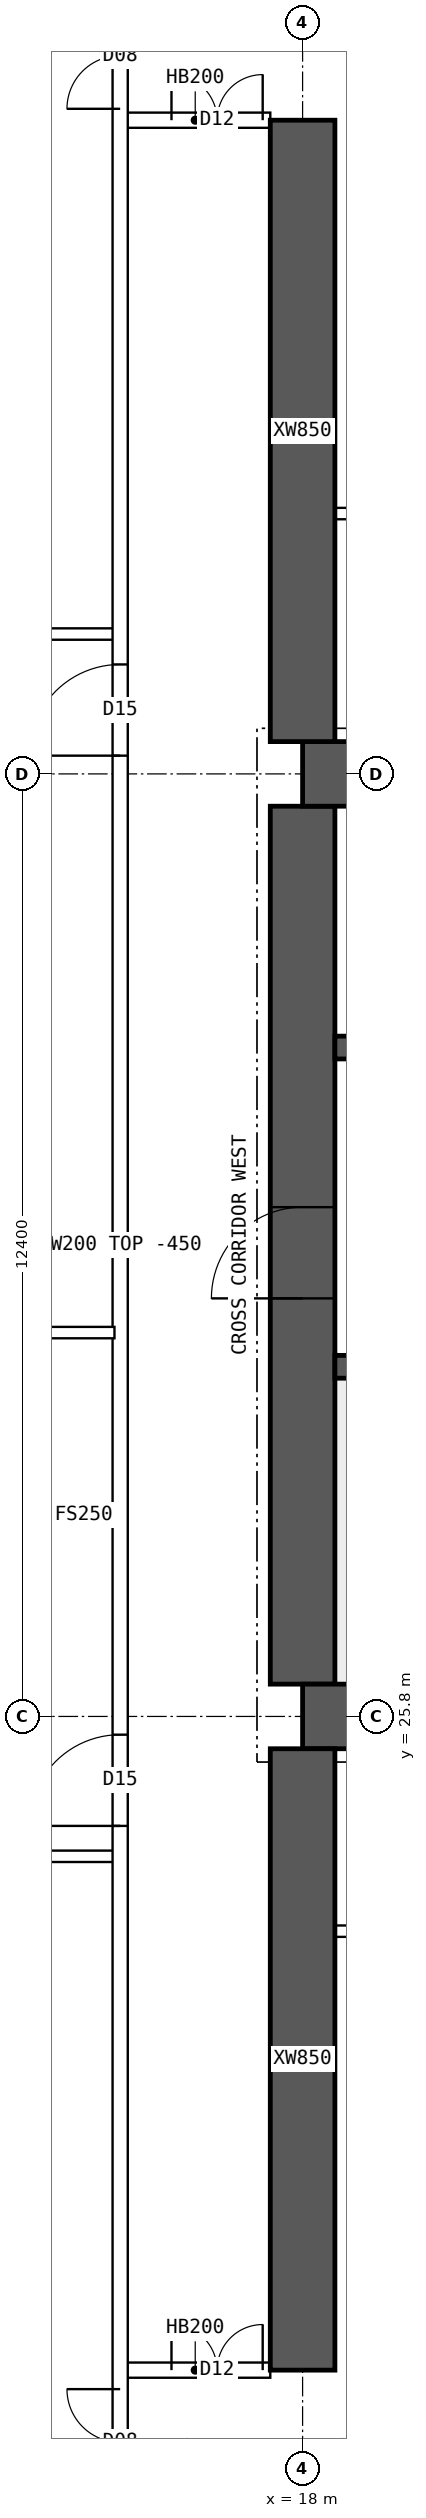
"""IFC4 building model, lengths in metres.
Left out: names, types, materials, properties, quantities, classifications, styles, units other than length and angle.
Written with IfcOpenShell. Run it as: python <this file> out.ifc"""

import sys

from ifc_helpers import new_model, si_unit, direction, frame, frame_2d, origin, place, context, subcontext, project, spatial, polyline, rectangle, outline, extrude, element, fill, save


model = new_model("IFC4")
c1 = context("Model", 3, precision=1e-05, world=origin(), true_north=direction((0.0, 1.0)))
c2 = subcontext(c1, "Body", "Model", "MODEL_VIEW")
j1 = project(units=[si_unit("LENGTHUNIT", "METRE"), si_unit("PLANEANGLEUNIT", "RADIAN")], contexts=[c1])
p1 = place(None, origin())
s1 = spatial("IfcSite", under=j1, at=p1, CompositionType="ELEMENT")
p2 = place(p1, origin())
s2 = spatial("IfcBuilding", under=s1, at=p2, CompositionType="ELEMENT")
p3 = place(p2, frame((0.0, 0.0, 174.85)))
s3 = spatial("IfcBuildingStorey", under=s2, at=p3, CompositionType="ELEMENT", Elevation=174.85)
for number, where, z_axis, x_axis in (
    (1, (18.0, 25.8, 0.0), (0.0, 0.0, 1.0), (1.0, 0.0, 0.0)),
    (2, (18.0, 38.2, 0.0), (0.0, 0.0, 1.0), (1.0, 0.0, 0.0)),
):
    element("IfcWall", number, at=place(p3, frame(where, z_axis=z_axis, x_axis=x_axis)), inside=s3, PredefinedType="SHEAR", context=c2, shape_type="SweptSolid", body=[
        extrude(rectangle(XDim=48.0, YDim=0.85, at=frame_2d((24.0, 0.0))), origin(), (0.0, 0.0, 1.0), 3.75),
    ])
p4 = place(p3, frame((18.0, 26.225, 0.0), z_axis=(0.0, 0.0, 1.0), x_axis=(0.0, 1.0, 0.0)))
e3 = element("IfcWall", 3, at=p4, inside=s3, PredefinedType="SHEAR", context=c2, shape_type="SweptSolid", body=[
    extrude(rectangle(XDim=11.55, YDim=0.85, at=frame_2d((5.775, 0.0))), origin(), (0.0, 0.0, 1.0), 3.75),
])
p5 = place(p4, frame((5.075, 0.0, 0.0)))
e4 = element("IfcOpeningElement", 4, at=p5, cuts=e3, PredefinedType="OPENING", context=c2, shape_type="SweptSolid", body=[
    extrude(rectangle(XDim=1.2, YDim=2.1, at=frame_2d((0.6, 1.05))), frame((0.0, 0.435, 0.0), z_axis=(0.0, -1.0, 0.0), x_axis=(1.0, 0.0, 0.0)), (0.0, 0.0, 1.0), 0.87),
])
p6 = place(p3, frame((18.425, 30.4, 0.0), z_axis=(0.0, 0.0, 1.0), x_axis=(1.0, 0.0, 0.0)))
e5 = element("IfcWall", 5, at=p6, inside=s3, PredefinedType="SHEAR", context=c2, shape_type="SweptSolid", body=[
    extrude(rectangle(XDim=47.15, YDim=0.3, at=frame_2d((23.575, 0.0))), origin(), (0.0, 0.0, 1.0), 3.75),
])
p7 = place(p6, frame((0.4, 0.0, 0.0)))
e6 = element("IfcOpeningElement", 6, at=p7, cuts=e5, PredefinedType="OPENING", context=c2, shape_type="SweptSolid", body=[
    extrude(rectangle(XDim=1.0, YDim=2.1, at=frame_2d((0.5, 1.05))), frame((0.0, 0.16, 0.0), z_axis=(0.0, -1.0, 0.0), x_axis=(1.0, 0.0, 0.0)), (0.0, 0.0, 1.0), 0.32),
])
p8 = place(p6, frame((45.75, 0.0, 0.0)))
e7 = element("IfcOpeningElement", 7, at=p8, cuts=e5, PredefinedType="OPENING", context=c2, shape_type="SweptSolid", body=[
    extrude(rectangle(XDim=1.0, YDim=2.1, at=frame_2d((0.5, 1.05))), frame((0.0, 0.16, 0.0), z_axis=(0.0, -1.0, 0.0), x_axis=(1.0, 0.0, 0.0)), (0.0, 0.0, 1.0), 0.32),
])
p9 = place(p6, frame((8.325, 0.0, 0.0)))
e8 = element("IfcOpeningElement", 8, at=p9, cuts=e5, PredefinedType="OPENING", context=c2, shape_type="SweptSolid", body=[
    extrude(rectangle(XDim=1.1, YDim=2.1, at=frame_2d((0.55, 1.05))), frame((0.0, 0.16, 0.0), z_axis=(0.0, -1.0, 0.0), x_axis=(1.0, 0.0, 0.0)), (0.0, 0.0, 1.0), 0.32),
])
p10 = place(p6, frame((10.925, 0.0, 0.0)))
e9 = element("IfcOpeningElement", 9, at=p10, cuts=e5, PredefinedType="OPENING", context=c2, shape_type="SweptSolid", body=[
    extrude(rectangle(XDim=1.1, YDim=2.1, at=frame_2d((0.55, 1.05))), frame((0.0, 0.16, 0.0), z_axis=(0.0, -1.0, 0.0), x_axis=(1.0, 0.0, 0.0)), (0.0, 0.0, 1.0), 0.32),
])
p11 = place(p6, frame((13.525, 0.0, 0.0)))
e10 = element("IfcOpeningElement", 10, at=p11, cuts=e5, PredefinedType="OPENING", context=c2, shape_type="SweptSolid", body=[
    extrude(rectangle(XDim=1.1, YDim=2.1, at=frame_2d((0.55, 1.05))), frame((0.0, 0.16, 0.0), z_axis=(0.0, -1.0, 0.0), x_axis=(1.0, 0.0, 0.0)), (0.0, 0.0, 1.0), 0.32),
])
p12 = place(p6, frame((16.125, 0.0, 0.0)))
e11 = element("IfcOpeningElement", 11, at=p12, cuts=e5, PredefinedType="OPENING", context=c2, shape_type="SweptSolid", body=[
    extrude(rectangle(XDim=1.1, YDim=2.1, at=frame_2d((0.55, 1.05))), frame((0.0, 0.16, 0.0), z_axis=(0.0, -1.0, 0.0), x_axis=(1.0, 0.0, 0.0)), (0.0, 0.0, 1.0), 0.32),
])
p13 = place(p6, frame((18.9, 0.0, 0.0)))
e12 = element("IfcOpeningElement", 12, at=p13, cuts=e5, PredefinedType="OPENING", context=c2, shape_type="SweptSolid", body=[
    extrude(rectangle(XDim=0.9, YDim=2.1, at=frame_2d((0.45, 1.05))), frame((0.0, 0.16, 0.0), z_axis=(0.0, -1.0, 0.0), x_axis=(1.0, 0.0, 0.0)), (0.0, 0.0, 1.0), 0.32),
])
p14 = place(p6, frame((30.192, 0.0, 0.0)))
e13 = element("IfcOpeningElement", 13, at=p14, cuts=e5, PredefinedType="OPENING", context=c2, shape_type="SweptSolid", body=[
    extrude(rectangle(XDim=1.1, YDim=2.1, at=frame_2d((0.55, 1.05))), frame((0.0, 0.16, 0.0), z_axis=(0.0, -1.0, 0.0), x_axis=(1.0, 0.0, 0.0)), (0.0, 0.0, 1.0), 0.32),
])
p15 = place(p6, frame((33.725, 0.0, 0.0)))
e14 = element("IfcOpeningElement", 14, at=p15, cuts=e5, PredefinedType="OPENING", context=c2, shape_type="SweptSolid", body=[
    extrude(rectangle(XDim=1.1, YDim=2.1, at=frame_2d((0.55, 1.05))), frame((0.0, 0.16, 0.0), z_axis=(0.0, -1.0, 0.0), x_axis=(1.0, 0.0, 0.0)), (0.0, 0.0, 1.0), 0.32),
])
p16 = place(p6, frame((37.258, 0.0, 0.0)))
e15 = element("IfcOpeningElement", 15, at=p16, cuts=e5, PredefinedType="OPENING", context=c2, shape_type="SweptSolid", body=[
    extrude(rectangle(XDim=1.1, YDim=2.1, at=frame_2d((0.55, 1.05))), frame((0.0, 0.16, 0.0), z_axis=(0.0, -1.0, 0.0), x_axis=(1.0, 0.0, 0.0)), (0.0, 0.0, 1.0), 0.32),
])
p17 = place(p3, frame((18.425, 34.6, 0.0), z_axis=(0.0, 0.0, 1.0), x_axis=(1.0, 0.0, 0.0)))
e16 = element("IfcWall", 16, at=p17, inside=s3, PredefinedType="SHEAR", context=c2, shape_type="SweptSolid", body=[
    extrude(rectangle(XDim=47.15, YDim=0.3, at=frame_2d((23.575, 0.0))), origin(), (0.0, 0.0, 1.0), 3.75),
])
p18 = place(p17, frame((0.9, 0.0, 0.0)))
e17 = element("IfcOpeningElement", 17, at=p18, cuts=e16, PredefinedType="OPENING", context=c2, shape_type="SweptSolid", body=[
    extrude(rectangle(XDim=1.1, YDim=2.1, at=frame_2d((0.55, 1.05))), frame((0.0, 0.16, 0.0), z_axis=(0.0, -1.0, 0.0), x_axis=(1.0, 0.0, 0.0)), (0.0, 0.0, 1.0), 0.32),
])
p19 = place(p17, frame((45.15, 0.0, 0.0)))
e18 = element("IfcOpeningElement", 18, at=p19, cuts=e16, PredefinedType="OPENING", context=c2, shape_type="SweptSolid", body=[
    extrude(rectangle(XDim=1.1, YDim=2.1, at=frame_2d((0.55, 1.05))), frame((0.0, 0.16, 0.0), z_axis=(0.0, -1.0, 0.0), x_axis=(1.0, 0.0, 0.0)), (0.0, 0.0, 1.0), 0.32),
])
p20 = place(p17, frame((4.175, 0.0, 0.0)))
e19 = element("IfcOpeningElement", 19, at=p20, cuts=e16, PredefinedType="OPENING", context=c2, shape_type="SweptSolid", body=[
    extrude(rectangle(XDim=0.9, YDim=2.1, at=frame_2d((0.45, 1.05))), frame((0.0, 0.16, 0.0), z_axis=(0.0, -1.0, 0.0), x_axis=(1.0, 0.0, 0.0)), (0.0, 0.0, 1.0), 0.32),
])
p21 = place(p17, frame((42.075, 0.0, 0.0)))
e20 = element("IfcOpeningElement", 20, at=p21, cuts=e16, PredefinedType="OPENING", context=c2, shape_type="SweptSolid", body=[
    extrude(rectangle(XDim=0.9, YDim=2.1, at=frame_2d((0.45, 1.05))), frame((0.0, 0.16, 0.0), z_axis=(0.0, -1.0, 0.0), x_axis=(1.0, 0.0, 0.0)), (0.0, 0.0, 1.0), 0.32),
])
p22 = place(p17, frame((8.95, 0.0, 0.0)))
e21 = element("IfcOpeningElement", 21, at=p22, cuts=e16, PredefinedType="OPENING", context=c2, shape_type="SweptSolid", body=[
    extrude(rectangle(XDim=0.9, YDim=2.1, at=frame_2d((0.45, 1.05))), frame((0.0, 0.16, 0.0), z_axis=(0.0, -1.0, 0.0), x_axis=(1.0, 0.0, 0.0)), (0.0, 0.0, 1.0), 0.32),
])
p23 = place(p17, frame((12.924, 0.0, 0.0)))
e22 = element("IfcOpeningElement", 22, at=p23, cuts=e16, PredefinedType="OPENING", context=c2, shape_type="SweptSolid", body=[
    extrude(rectangle(XDim=0.9, YDim=2.1, at=frame_2d((0.45, 1.05))), frame((0.0, 0.16, 0.0), z_axis=(0.0, -1.0, 0.0), x_axis=(1.0, 0.0, 0.0)), (0.0, 0.0, 1.0), 0.32),
])
p24 = place(p17, frame((16.571, 0.0, 0.0)))
e23 = element("IfcOpeningElement", 23, at=p24, cuts=e16, PredefinedType="OPENING", context=c2, shape_type="SweptSolid", body=[
    extrude(rectangle(XDim=0.9, YDim=2.1, at=frame_2d((0.45, 1.05))), frame((0.0, 0.16, 0.0), z_axis=(0.0, -1.0, 0.0), x_axis=(1.0, 0.0, 0.0)), (0.0, 0.0, 1.0), 0.32),
])
p25 = place(p17, frame((20.33, 0.0, 0.0)))
e24 = element("IfcOpeningElement", 24, at=p25, cuts=e16, PredefinedType="OPENING", context=c2, shape_type="SweptSolid", body=[
    extrude(rectangle(XDim=0.9, YDim=2.1, at=frame_2d((0.45, 1.05))), frame((0.0, 0.16, 0.0), z_axis=(0.0, -1.0, 0.0), x_axis=(1.0, 0.0, 0.0)), (0.0, 0.0, 1.0), 0.32),
])
p26 = place(p17, frame((24.736, 0.0, 0.0)))
e25 = element("IfcOpeningElement", 25, at=p26, cuts=e16, PredefinedType="OPENING", context=c2, shape_type="SweptSolid", body=[
    extrude(rectangle(XDim=0.9, YDim=2.1, at=frame_2d((0.45, 1.05))), frame((0.0, 0.16, 0.0), z_axis=(0.0, -1.0, 0.0), x_axis=(1.0, 0.0, 0.0)), (0.0, 0.0, 1.0), 0.32),
])
p27 = place(p17, frame((27.533, 0.0, 0.0)))
e26 = element("IfcOpeningElement", 26, at=p27, cuts=e16, PredefinedType="OPENING", context=c2, shape_type="SweptSolid", body=[
    extrude(rectangle(XDim=0.9, YDim=2.1, at=frame_2d((0.45, 1.05))), frame((0.0, 0.16, 0.0), z_axis=(0.0, -1.0, 0.0), x_axis=(1.0, 0.0, 0.0)), (0.0, 0.0, 1.0), 0.32),
])
p28 = place(p17, frame((29.5, 0.0, 0.0)))
e27 = element("IfcOpeningElement", 27, at=p28, cuts=e16, PredefinedType="OPENING", context=c2, shape_type="SweptSolid", body=[
    extrude(rectangle(XDim=0.9, YDim=2.1, at=frame_2d((0.45, 1.05))), frame((0.0, 0.16, 0.0), z_axis=(0.0, -1.0, 0.0), x_axis=(1.0, 0.0, 0.0)), (0.0, 0.0, 1.0), 0.32),
])
p29 = place(p17, frame((31.932, 0.0, 0.0)))
e28 = element("IfcOpeningElement", 28, at=p29, cuts=e16, PredefinedType="OPENING", context=c2, shape_type="SweptSolid", body=[
    extrude(rectangle(XDim=0.9, YDim=2.1, at=frame_2d((0.45, 1.05))), frame((0.0, 0.16, 0.0), z_axis=(0.0, -1.0, 0.0), x_axis=(1.0, 0.0, 0.0)), (0.0, 0.0, 1.0), 0.32),
])
p30 = place(p17, frame((34.667, 0.0, 0.0)))
e29 = element("IfcOpeningElement", 29, at=p30, cuts=e16, PredefinedType="OPENING", context=c2, shape_type="SweptSolid", body=[
    extrude(rectangle(XDim=0.9, YDim=2.1, at=frame_2d((0.45, 1.05))), frame((0.0, 0.16, 0.0), z_axis=(0.0, -1.0, 0.0), x_axis=(1.0, 0.0, 0.0)), (0.0, 0.0, 1.0), 0.32),
])
p31 = place(p17, frame((37.707, 0.0, 0.0)))
e30 = element("IfcOpeningElement", 30, at=p31, cuts=e16, PredefinedType="OPENING", context=c2, shape_type="SweptSolid", body=[
    extrude(rectangle(XDim=0.9, YDim=2.1, at=frame_2d((0.45, 1.05))), frame((0.0, 0.16, 0.0), z_axis=(0.0, -1.0, 0.0), x_axis=(1.0, 0.0, 0.0)), (0.0, 0.0, 1.0), 0.32),
])
for number, where, z_axis, x_axis in (
    (31, (18.0, 17.2, 0.0), (0.0, 0.0, 1.0), (0.0, 1.0, 0.0)),
    (32, (18.0, 38.625, 0.0), (0.0, 0.0, 1.0), (0.0, 1.0, 0.0)),
):
    element("IfcWall", number, at=place(p3, frame(where, z_axis=z_axis, x_axis=x_axis)), inside=s3, PredefinedType="SHEAR", context=c2, shape_type="SweptSolid", body=[
        extrude(rectangle(XDim=8.175, YDim=0.85, at=frame_2d((4.087, 0.0))), origin(), (0.0, 0.0, 1.0), 3.75),
    ])
p32 = place(p3, frame((15.6, 17.2, 0.0), z_axis=(0.0, 0.0, 1.0), x_axis=(1.0, 0.0, 0.0)))
e33 = element("IfcWall", 33, at=p32, inside=s3, PredefinedType="SOLIDWALL", context=c2, shape_type="SweptSolid", body=[
    extrude(rectangle(XDim=1.975, YDim=0.2, at=frame_2d((0.987, 0.0))), origin(), (0.0, 0.0, 1.0), 3.3),
])
p33 = place(p32, frame((0.675, 0.0, 0.0)))
e34 = element("IfcOpeningElement", 34, at=p33, cuts=e33, PredefinedType="OPENING", context=c2, shape_type="SweptSolid", body=[
    extrude(rectangle(XDim=1.2, YDim=2.1, at=frame_2d((0.6, 1.05))), frame((0.0, 0.11, 0.0), z_axis=(0.0, -1.0, 0.0), x_axis=(1.0, 0.0, 0.0)), (0.0, 0.0, 1.0), 0.22),
])
p34 = place(p3, frame((15.6, 46.8, 0.0), z_axis=(0.0, 0.0, 1.0), x_axis=(1.0, 0.0, 0.0)))
e35 = element("IfcWall", 35, at=p34, inside=s3, PredefinedType="SOLIDWALL", context=c2, shape_type="SweptSolid", body=[
    extrude(rectangle(XDim=1.975, YDim=0.2, at=frame_2d((0.987, 0.0))), origin(), (0.0, 0.0, 1.0), 3.3),
])
p35 = place(p34, frame((0.675, 0.0, 0.0)))
e36 = element("IfcOpeningElement", 36, at=p35, cuts=e35, PredefinedType="OPENING", context=c2, shape_type="SweptSolid", body=[
    extrude(rectangle(XDim=1.2, YDim=2.1, at=frame_2d((0.6, 1.05))), frame((0.0, 0.11, 0.0), z_axis=(0.0, -1.0, 0.0), x_axis=(1.0, 0.0, 0.0)), (0.0, 0.0, 1.0), 0.22),
])
p36 = place(p3, frame((18.425, 22.975, 0.0), z_axis=(0.0, 0.0, 1.0), x_axis=(1.0, 0.0, 0.0)))
e37 = element("IfcWall", 37, at=p36, inside=s3, PredefinedType="PARTITIONING", context=c2, shape_type="SweptSolid", body=[
    extrude(rectangle(XDim=5.5, YDim=0.15, at=frame_2d((2.75, 0.0))), origin(), (0.0, 0.0, 1.0), 3.3),
])
p37 = place(p36, frame((0.4, 0.0, 0.0)))
e38 = element("IfcOpeningElement", 38, at=p37, cuts=e37, PredefinedType="OPENING", context=c2, shape_type="SweptSolid", body=[
    extrude(rectangle(XDim=1.0, YDim=2.1, at=frame_2d((0.5, 1.05))), frame((0.0, 0.085, 0.0), z_axis=(0.0, -1.0, 0.0), x_axis=(1.0, 0.0, 0.0)), (0.0, 0.0, 1.0), 0.17),
])
p38 = place(p3, frame((23.925, 41.625, 0.0), z_axis=(0.0, 0.0, 1.0), x_axis=(-1.0, 0.0, 0.0)))
e39 = element("IfcWall", 39, at=p38, inside=s3, PredefinedType="PARTITIONING", context=c2, shape_type="SweptSolid", body=[
    extrude(rectangle(XDim=5.5, YDim=0.15, at=frame_2d((2.75, 0.0))), origin(), (0.0, 0.0, 1.0), 3.3),
])
p39 = place(p38, frame((0.4, 0.0, 0.0)))
e40 = element("IfcOpeningElement", 40, at=p39, cuts=e39, PredefinedType="OPENING", context=c2, shape_type="SweptSolid", body=[
    extrude(rectangle(XDim=1.0, YDim=2.1, at=frame_2d((0.5, 1.05))), frame((0.0, 0.085, 0.0), z_axis=(0.0, -1.0, 0.0), x_axis=(1.0, 0.0, 0.0)), (0.0, 0.0, 1.0), 0.17),
])
p40 = place(p3, frame((8.705, 30.85, 0.0), z_axis=(0.0, 0.0, 1.0), x_axis=(1.0, 0.0, 0.0)))
e41 = element("IfcWall", 41, at=p40, inside=s3, PredefinedType="PARTITIONING", context=c2, shape_type="SweptSolid", body=[
    extrude(outline(polyline([(0.0, 0.0), (6.82, 0.0), (6.82, 3.3), (3.597, 3.3), (3.595, 2.85), (2.997, 2.85), (2.995, 3.3), (0.0, 3.3), (0.0, 0.0)])), frame((0.0, 0.075, 0.0), z_axis=(0.0, -1.0, 0.0), x_axis=(1.0, 0.0, 0.0)), (0.0, 0.0, 1.0), 0.15),
])
p41 = place(p3, frame((15.6, 10.446, 0.0), z_axis=(0.0, 0.0, 1.0), x_axis=(0.0, 1.0, 0.0)))
e42 = element("IfcWall", 42, at=p41, inside=s3, PredefinedType="SOLIDWALL", context=c2, shape_type="SweptSolid", body=[
    extrude(rectangle(XDim=43.107, YDim=0.2, at=frame_2d((21.554, 0.0))), origin(), (0.0, 0.0, 1.0), 3.3),
])
p42 = place(p41, frame((13.914, 0.0, 0.0)))
e43 = element("IfcOpeningElement", 43, at=p42, cuts=e42, PredefinedType="OPENING", context=c2, shape_type="SweptSolid", body=[
    extrude(rectangle(XDim=1.2, YDim=2.1, at=frame_2d((0.6, 1.05))), frame((0.0, 0.11, 0.0), z_axis=(0.0, -1.0, 0.0), x_axis=(1.0, 0.0, 0.0)), (0.0, 0.0, 1.0), 0.22),
])
p43 = place(p41, frame((27.994, 0.0, 0.0)))
e44 = element("IfcOpeningElement", 44, at=p43, cuts=e42, PredefinedType="OPENING", context=c2, shape_type="SweptSolid", body=[
    extrude(rectangle(XDim=1.2, YDim=2.1, at=frame_2d((0.6, 1.05))), frame((0.0, 0.11, 0.0), z_axis=(0.0, -1.0, 0.0), x_axis=(1.0, 0.0, 0.0)), (0.0, 0.0, 1.0), 0.22),
])
p44 = place(p41, frame((5.104, 0.0, 0.0)))
e45 = element("IfcOpeningElement", 45, at=p44, cuts=e42, PredefinedType="OPENING", context=c2, shape_type="SweptSolid", body=[
    extrude(rectangle(XDim=1.4, YDim=2.1, at=frame_2d((0.7, 1.05))), frame((0.0, 0.11, 0.0), z_axis=(0.0, -1.0, 0.0), x_axis=(1.0, 0.0, 0.0)), (0.0, 0.0, 1.0), 0.22),
])
p45 = place(p41, frame((36.504, 0.0, 0.0)))
e46 = element("IfcOpeningElement", 46, at=p45, cuts=e42, PredefinedType="OPENING", context=c2, shape_type="SweptSolid", body=[
    extrude(rectangle(XDim=1.4, YDim=2.1, at=frame_2d((0.7, 1.05))), frame((0.0, 0.11, 0.0), z_axis=(0.0, -1.0, 0.0), x_axis=(1.0, 0.0, 0.0)), (0.0, 0.0, 1.0), 0.22),
])
for number, where, z_axis, x_axis in (
    (47, (8.705, 23.96, 0.0), (0.0, 0.0, 1.0), (1.0, 0.0, 0.0)),
    (48, (8.705, 40.04, 0.0), (0.0, 0.0, 1.0), (1.0, 0.0, 0.0)),
):
    element("IfcWall", number, at=place(p3, frame(where, z_axis=z_axis, x_axis=x_axis)), inside=s3, PredefinedType="PARTITIONING", context=c2, shape_type="SweptSolid", body=[
        extrude(rectangle(XDim=6.82, YDim=0.15, at=frame_2d((3.41, 0.0))), origin(), (0.0, 0.0, 1.0), 3.3),
    ])
p46 = place(p5, origin())
e49 = element("IfcDoor", 49, at=p46, inside=s3, OperationType="SINGLE_SWING_LEFT", PredefinedType="DOOR", context=c2, shape_type="SweptSolid", body=[
    extrude(rectangle(XDim=1.2, YDim=2.1, at=frame_2d((0.6, 1.05))), frame((0.0, 0.025, 0.0), z_axis=(0.0, -1.0, 0.0), x_axis=(1.0, 0.0, 0.0)), (0.0, 0.0, 1.0), 0.05),
])
fill(e4, e49)
p47 = place(p33, origin())
e50 = element("IfcDoor", 50, at=p47, inside=s3, OperationType="DOUBLE_DOOR_SINGLE_SWING", PredefinedType="DOOR", context=c2, shape_type="SweptSolid", body=[
    extrude(rectangle(XDim=1.2, YDim=2.1, at=frame_2d((0.6, 1.05))), frame((0.0, 0.025, 0.0), z_axis=(0.0, -1.0, 0.0), x_axis=(1.0, 0.0, 0.0)), (0.0, 0.0, 1.0), 0.05),
])
fill(e34, e50)
p48 = place(p35, origin())
e51 = element("IfcDoor", 51, at=p48, inside=s3, OperationType="DOUBLE_DOOR_SINGLE_SWING", PredefinedType="DOOR", context=c2, shape_type="SweptSolid", body=[
    extrude(rectangle(XDim=1.2, YDim=2.1, at=frame_2d((0.6, 1.05))), frame((0.0, 0.025, 0.0), z_axis=(0.0, -1.0, 0.0), x_axis=(1.0, 0.0, 0.0)), (0.0, 0.0, 1.0), 0.05),
])
fill(e36, e51)
p49 = place(p42, origin())
e52 = element("IfcDoor", 52, at=p49, inside=s3, OperationType="SINGLE_SWING_LEFT", PredefinedType="DOOR", context=c2, shape_type="SweptSolid", body=[
    extrude(rectangle(XDim=1.2, YDim=2.1, at=frame_2d((0.6, 1.05))), frame((0.0, 0.025, 0.0), z_axis=(0.0, -1.0, 0.0), x_axis=(1.0, 0.0, 0.0)), (0.0, 0.0, 1.0), 0.05),
])
fill(e43, e52)
p50 = place(p43, origin())
e53 = element("IfcDoor", 53, at=p50, inside=s3, OperationType="SINGLE_SWING_LEFT", PredefinedType="DOOR", context=c2, shape_type="SweptSolid", body=[
    extrude(rectangle(XDim=1.2, YDim=2.1, at=frame_2d((0.6, 1.05))), frame((0.0, 0.025, 0.0), z_axis=(0.0, -1.0, 0.0), x_axis=(1.0, 0.0, 0.0)), (0.0, 0.0, 1.0), 0.05),
])
fill(e44, e53)
p51 = place(p44, origin())
e54 = element("IfcDoor", 54, at=p51, inside=s3, OperationType="DOUBLE_DOOR_SINGLE_SWING", PredefinedType="DOOR", context=c2, shape_type="SweptSolid", body=[
    extrude(rectangle(XDim=1.4, YDim=2.1, at=frame_2d((0.7, 1.05))), frame((0.0, 0.025, 0.0), z_axis=(0.0, -1.0, 0.0), x_axis=(1.0, 0.0, 0.0)), (0.0, 0.0, 1.0), 0.05),
])
fill(e45, e54)
p52 = place(p45, origin())
e55 = element("IfcDoor", 55, at=p52, inside=s3, OperationType="DOUBLE_DOOR_SINGLE_SWING", PredefinedType="DOOR", context=c2, shape_type="SweptSolid", body=[
    extrude(rectangle(XDim=1.4, YDim=2.1, at=frame_2d((0.7, 1.05))), frame((0.0, 0.025, 0.0), z_axis=(0.0, -1.0, 0.0), x_axis=(1.0, 0.0, 0.0)), (0.0, 0.0, 1.0), 0.05),
])
fill(e46, e55)
save(model, sys.argv[1])
